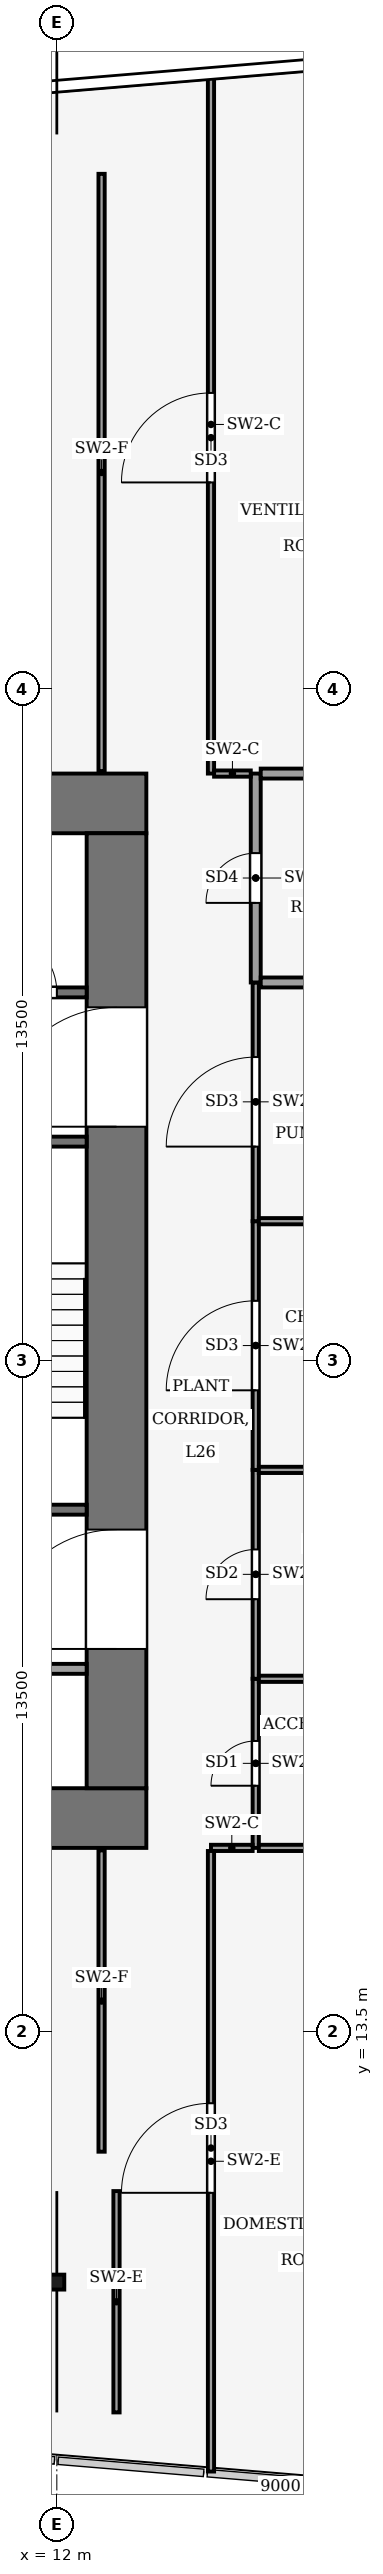
"""IFC4 building model, lengths in metres.
Left out: names, types, materials, properties, quantities, classifications, styles, units other than length and angle.
Written with IfcOpenShell. Run it as: python <this file> out.ifc"""

import sys

from ifc_helpers import new_model, si_unit, direction, frame, frame_2d, origin, origin_2d, place, context, subcontext, project, spatial, rectangle, hollow_rectangle, i_section, extrude, element, fill, save


model = new_model("IFC4")
c1 = context("Model", 3, precision=1e-05, world=origin(), true_north=direction((0.0, 1.0)))
c2 = subcontext(c1, "Body", "Model", "MODEL_VIEW")
j1 = project(units=[si_unit("LENGTHUNIT", "METRE"), si_unit("PLANEANGLEUNIT", "RADIAN")], contexts=[c1])
p1 = place(None, origin())
s1 = spatial("IfcSite", under=j1, at=p1, CompositionType="ELEMENT")
p2 = place(p1, origin())
s2 = spatial("IfcBuilding", under=s1, at=p2, CompositionType="ELEMENT")
p3 = place(p2, frame((0.0, 0.0, 114.0)))
s3 = spatial("IfcBuildingStorey", under=s2, at=p3, CompositionType="ELEMENT", Elevation=114.0)
for number, where, z_axis, x_axis in (
    (1, (-13.8, 17.8, -0.25), (0.0, 0.0, 1.0), (1.0, 0.0, 0.0)),
    (2, (-13.8, 38.2, -0.25), (0.0, 0.0, 1.0), (1.0, 0.0, 0.0)),
):
    element("IfcWall", number, at=place(p3, frame(where, z_axis=z_axis, x_axis=x_axis)), inside=s3, PredefinedType="SHEAR", context=c2, shape_type="SweptSolid", body=[
        extrude(rectangle(XDim=27.6, YDim=1.2, at=frame_2d((13.8, 0.0))), origin(), (0.0, 0.0, 1.0), 7.12),
    ])
p4 = place(p3, frame((13.2, 18.4, -0.25), z_axis=(0.0, 0.0, 1.0), x_axis=(0.0, 1.0, 0.0)))
e3 = element("IfcWall", 3, at=p4, inside=s3, PredefinedType="SHEAR", context=c2, shape_type="SweptSolid", body=[
    extrude(rectangle(XDim=19.2, YDim=1.2, at=frame_2d((9.6, 0.0))), origin(), (0.0, 0.0, 1.0), 7.12),
])
p5 = place(p4, frame((2.8, 0.0, 0.25)))
e4 = element("IfcOpeningElement", 4, at=p5, cuts=e3, PredefinedType="OPENING", context=c2, shape_type="SweptSolid", body=[
    extrude(rectangle(XDim=2.4, YDim=2.4, at=frame_2d((1.2, 1.2))), frame((0.0, 0.61, 0.0), z_axis=(0.0, -1.0, 0.0), x_axis=(1.0, 0.0, 0.0)), (0.0, 0.0, 1.0), 1.22),
])
p6 = place(p4, frame((13.3, 0.0, 0.25)))
e5 = element("IfcOpeningElement", 5, at=p6, cuts=e3, PredefinedType="OPENING", context=c2, shape_type="SweptSolid", body=[
    extrude(rectangle(XDim=2.4, YDim=2.4, at=frame_2d((1.2, 1.2))), frame((0.0, 0.61, 0.0), z_axis=(0.0, -1.0, 0.0), x_axis=(1.0, 0.0, 0.0)), (0.0, 0.0, 1.0), 1.22),
])
p7 = place(p3, frame((12.0, 51.65, 0.337), z_axis=(0.0, 0.786264551358, 0.617890002571), x_axis=(-1.0, 0.0, 0.0)))
e6 = element("IfcColumn", 6, at=p7, inside=s3, PredefinedType="COLUMN", context=c2, shape_type="SweptSolid", body=[
    extrude(hollow_rectangle(XDim=0.8, YDim=0.8, WallThickness=0.04, at=origin_2d()), origin(), (0.0, 0.0, 1.0), 10.238),
])
p8 = place(p3, frame((12.0, 5.85, 0.253), z_axis=(0.0, 0.565283029437, 0.824897021834), x_axis=(-1.0, 0.0, 0.0)))
e7 = element("IfcColumn", 7, at=p8, inside=s3, PredefinedType="COLUMN", context=c2, shape_type="SweptSolid", body=[
    extrude(hollow_rectangle(XDim=0.8, YDim=0.8, WallThickness=0.04, at=origin_2d()), origin(), (0.0, 0.0, 1.0), 7.872),
])
p9 = place(p3, frame((12.0, 8.47, 5.003), z_axis=(0.0, 0.0, 1.0), x_axis=(1.0, 0.0, 0.0)))
e8 = element("IfcColumn", 8, at=p9, inside=s3, PredefinedType="COLUMN", context=c2, shape_type="SweptSolid", body=[
    extrude(i_section(OverallWidth=0.3, OverallDepth=0.3, WebThickness=0.011, FlangeThickness=0.019, FilletRadius=0.027, at=origin_2d()), origin(), (0.0, 0.0, 1.0), 1.697),
])
p10 = place(p3, frame((6.0, 20.8, 0.0), z_axis=(0.0, 0.0, 1.0), x_axis=(1.0, 0.0, 0.0)))
e9 = element("IfcWall", 9, at=p10, inside=s3, PredefinedType="PARTITIONING", context=c2, shape_type="SweptSolid", body=[
    extrude(rectangle(XDim=6.6, YDim=0.2, at=frame_2d((3.3, 0.0))), origin(), (0.0, 0.0, 1.0), 6.87),
])
p11 = place(p10, frame((2.8, 0.0, 0.0)))
e10 = element("IfcOpeningElement", 10, at=p11, cuts=e9, PredefinedType="OPENING", context=c2, shape_type="SweptSolid", body=[
    extrude(rectangle(XDim=1.0, YDim=2.1, at=frame_2d((0.5, 1.05))), frame((0.0, 0.11, 0.0), z_axis=(0.0, -1.0, 0.0), x_axis=(1.0, 0.0, 0.0)), (0.0, 0.0, 1.0), 0.22),
])
p12 = place(p3, frame((6.0, 24.0, 0.0), z_axis=(0.0, 0.0, 1.0), x_axis=(1.0, 0.0, 0.0)))
e11 = element("IfcWall", 11, at=p12, inside=s3, PredefinedType="PARTITIONING", context=c2, shape_type="SweptSolid", body=[
    extrude(rectangle(XDim=6.6, YDim=0.2, at=frame_2d((3.3, 0.0))), origin(), (0.0, 0.0, 1.0), 6.87),
])
p13 = place(p12, frame((0.9, 0.0, 0.0)))
e12 = element("IfcOpeningElement", 12, at=p13, cuts=e11, PredefinedType="OPENING", context=c2, shape_type="SweptSolid", body=[
    extrude(rectangle(XDim=1.0, YDim=2.1, at=frame_2d((0.5, 1.05))), frame((0.0, 0.11, 0.0), z_axis=(0.0, -1.0, 0.0), x_axis=(1.0, 0.0, 0.0)), (0.0, 0.0, 1.0), 0.22),
])
p14 = place(p12, frame((4.4, 0.0, 0.0)))
e13 = element("IfcOpeningElement", 13, at=p14, cuts=e11, PredefinedType="OPENING", context=c2, shape_type="SweptSolid", body=[
    extrude(rectangle(XDim=1.2, YDim=2.2, at=frame_2d((0.6, 1.1))), frame((0.0, 0.11, 0.0), z_axis=(0.0, -1.0, 0.0), x_axis=(1.0, 0.0, 0.0)), (0.0, 0.0, 1.0), 0.22),
])
p15 = place(p3, frame((6.0, 31.4, 0.0), z_axis=(0.0, 0.0, 1.0), x_axis=(1.0, 0.0, 0.0)))
e14 = element("IfcWall", 14, at=p15, inside=s3, PredefinedType="PARTITIONING", context=c2, shape_type="SweptSolid", body=[
    extrude(rectangle(XDim=6.6, YDim=0.2, at=frame_2d((3.3, 0.0))), origin(), (0.0, 0.0, 1.0), 6.87),
])
p16 = place(p3, frame((6.0, 34.4, 0.0), z_axis=(0.0, 0.0, 1.0), x_axis=(1.0, 0.0, 0.0)))
e15 = element("IfcWall", 15, at=p16, inside=s3, PredefinedType="PARTITIONING", context=c2, shape_type="SweptSolid", body=[
    extrude(rectangle(XDim=6.6, YDim=0.2, at=frame_2d((3.3, 0.0))), origin(), (0.0, 0.0, 1.0), 6.87),
])
p17 = place(p16, frame((4.8, 0.0, 0.0)))
e16 = element("IfcOpeningElement", 16, at=p17, cuts=e15, PredefinedType="OPENING", context=c2, shape_type="SweptSolid", body=[
    extrude(rectangle(XDim=1.2, YDim=2.2, at=frame_2d((0.6, 1.1))), frame((0.0, 0.11, 0.0), z_axis=(0.0, -1.0, 0.0), x_axis=(1.0, 0.0, 0.0)), (0.0, 0.0, 1.0), 0.22),
])
p18 = place(p3, frame((16.0, 17.2, 0.0), z_axis=(0.0, 0.0, 1.0), x_axis=(0.0, 1.0, 0.0)))
e17 = element("IfcWall", 17, at=p18, inside=s3, PredefinedType="PARTITIONING", context=c2, shape_type="SweptSolid", body=[
    extrude(rectangle(XDim=3.4, YDim=0.125, at=frame_2d((1.7, 0.0))), origin(), (0.0, 0.0, 1.0), 6.14),
])
p19 = place(p18, frame((1.25, 0.0, 0.0)))
e18 = element("IfcOpeningElement", 18, at=p19, cuts=e17, PredefinedType="OPENING", context=c2, shape_type="SweptSolid", body=[
    extrude(rectangle(XDim=0.9, YDim=2.1, at=frame_2d((0.45, 1.05))), frame((0.0, 0.073, 0.0), z_axis=(0.0, -1.0, 0.0), x_axis=(1.0, 0.0, 0.0)), (0.0, 0.0, 1.0), 0.145),
])
p20 = place(p3, frame((16.0, 20.6, 0.0), z_axis=(0.0, 0.0, 1.0), x_axis=(0.0, 1.0, 0.0)))
e19 = element("IfcWall", 19, at=p20, inside=s3, PredefinedType="PARTITIONING", context=c2, shape_type="SweptSolid", body=[
    extrude(rectangle(XDim=4.2, YDim=0.125, at=frame_2d((2.1, 0.0))), origin(), (0.0, 0.0, 1.0), 6.44),
])
p21 = place(p20, frame((1.6, 0.0, 0.0)))
e20 = element("IfcOpeningElement", 20, at=p21, cuts=e19, PredefinedType="OPENING", context=c2, shape_type="SweptSolid", body=[
    extrude(rectangle(XDim=1.0, YDim=2.1, at=frame_2d((0.5, 1.05))), frame((0.0, 0.073, 0.0), z_axis=(0.0, -1.0, 0.0), x_axis=(1.0, 0.0, 0.0)), (0.0, 0.0, 1.0), 0.145),
])
p22 = place(p3, frame((16.0, 24.8, 0.0), z_axis=(0.0, 0.0, 1.0), x_axis=(0.0, 1.0, 0.0)))
e21 = element("IfcWall", 21, at=p22, inside=s3, PredefinedType="PARTITIONING", context=c2, shape_type="SweptSolid", body=[
    extrude(rectangle(XDim=5.0, YDim=0.125, at=frame_2d((2.5, 0.0))), origin(), (0.0, 0.0, 1.0), 6.44),
])
p23 = place(p22, frame((1.6, 0.0, 0.0)))
e22 = element("IfcOpeningElement", 22, at=p23, cuts=e21, PredefinedType="OPENING", context=c2, shape_type="SweptSolid", body=[
    extrude(rectangle(XDim=1.8, YDim=2.4, at=frame_2d((0.9, 1.2))), frame((0.0, 0.073, 0.0), z_axis=(0.0, -1.0, 0.0), x_axis=(1.0, 0.0, 0.0)), (0.0, 0.0, 1.0), 0.145),
])
p24 = place(p3, frame((16.0, 29.8, 0.0), z_axis=(0.0, 0.0, 1.0), x_axis=(0.0, 1.0, 0.0)))
e23 = element("IfcWall", 23, at=p24, inside=s3, PredefinedType="PARTITIONING", context=c2, shape_type="SweptSolid", body=[
    extrude(rectangle(XDim=4.8, YDim=0.125, at=frame_2d((2.4, 0.0))), origin(), (0.0, 0.0, 1.0), 6.44),
])
p25 = place(p24, frame((1.5, 0.0, 0.0)))
e24 = element("IfcOpeningElement", 24, at=p25, cuts=e23, PredefinedType="OPENING", context=c2, shape_type="SweptSolid", body=[
    extrude(rectangle(XDim=1.8, YDim=2.4, at=frame_2d((0.9, 1.2))), frame((0.0, 0.073, 0.0), z_axis=(0.0, -1.0, 0.0), x_axis=(1.0, 0.0, 0.0)), (0.0, 0.0, 1.0), 0.145),
])
p26 = place(p3, frame((16.0, 34.6, 0.0), z_axis=(0.0, 0.0, 1.0), x_axis=(0.0, 1.0, 0.0)))
e25 = element("IfcWall", 25, at=p26, inside=s3, PredefinedType="PARTITIONING", context=c2, shape_type="SweptSolid", body=[
    extrude(rectangle(XDim=4.2, YDim=0.2, at=frame_2d((2.1, 0.0))), origin(), (0.0, 0.0, 1.0), 6.14),
])
p27 = place(p26, frame((1.6, 0.0, 0.0)))
e26 = element("IfcOpeningElement", 26, at=p27, cuts=e25, PredefinedType="OPENING", context=c2, shape_type="SweptSolid", body=[
    extrude(rectangle(XDim=1.0, YDim=2.1, at=frame_2d((0.5, 1.05))), frame((0.0, 0.11, 0.0), z_axis=(0.0, -1.0, 0.0), x_axis=(1.0, 0.0, 0.0)), (0.0, 0.0, 1.0), 0.22),
])
p28 = place(p3, frame((15.938, 17.2, 0.0), z_axis=(0.0, 0.0, 1.0), x_axis=(-1.0, 0.0, 0.0)))
e27 = element("IfcWall", 27, at=p28, inside=s3, PredefinedType="PARTITIONING", context=c2, shape_type="SweptSolid", body=[
    extrude(rectangle(XDim=0.837, YDim=0.125, at=frame_2d((0.419, 0.0))), origin(), (0.0, 0.0, 1.0), 6.14),
])
p29 = place(p3, frame((15.1, 4.662, 0.0), z_axis=(0.0, 0.0, 1.0), x_axis=(0.0, 1.0, 0.0)))
e28 = element("IfcWall", 28, at=p29, inside=s3, PredefinedType="PARTITIONING", context=c2, shape_type="SweptSolid", body=[
    extrude(rectangle(XDim=12.476, YDim=0.125, at=frame_2d((6.238, 0.0))), origin(), (0.0, 0.0, 1.0), 6.04),
])
p30 = place(p29, frame((5.604, 0.0, 0.0)))
e29 = element("IfcOpeningElement", 29, at=p30, cuts=e28, PredefinedType="OPENING", context=c2, shape_type="SweptSolid", body=[
    extrude(rectangle(XDim=1.8, YDim=2.4, at=frame_2d((0.9, 1.2))), frame((0.0, 0.073, 0.0), z_axis=(0.0, -1.0, 0.0), x_axis=(1.0, 0.0, 0.0)), (0.0, 0.0, 1.0), 0.145),
])
p31 = place(p3, frame((15.1, 38.8, 0.0), z_axis=(0.0, 0.0, 1.0), x_axis=(0.0, 1.0, 0.0)))
e30 = element("IfcWall", 30, at=p31, inside=s3, PredefinedType="PARTITIONING", context=c2, shape_type="SweptSolid", body=[
    extrude(rectangle(XDim=14.038, YDim=0.125, at=frame_2d((7.019, 0.0))), origin(), (0.0, 0.0, 1.0), 6.14),
])
p32 = place(p31, frame((5.854, 0.0, 0.0)))
e31 = element("IfcOpeningElement", 31, at=p32, cuts=e30, PredefinedType="OPENING", context=c2, shape_type="SweptSolid", body=[
    extrude(rectangle(XDim=1.8, YDim=2.4, at=frame_2d((0.9, 1.2))), frame((0.0, 0.073, 0.0), z_axis=(0.0, -1.0, 0.0), x_axis=(1.0, 0.0, 0.0)), (0.0, 0.0, 1.0), 0.145),
])
p33 = place(p3, frame((15.163, 38.8, 0.0), z_axis=(0.0, 0.0, 1.0), x_axis=(1.0, 0.0, 0.0)))
e32 = element("IfcWall", 32, at=p33, inside=s3, PredefinedType="PARTITIONING", context=c2, shape_type="SweptSolid", body=[
    extrude(rectangle(XDim=0.737, YDim=0.125, at=frame_2d((0.369, 0.0))), origin(), (0.0, 0.0, 1.0), 6.14),
])
p34 = place(p3, frame((16.062, 20.6, 0.0), z_axis=(0.0, 0.0, 1.0), x_axis=(1.0, 0.0, 0.0)))
e33 = element("IfcWall", 33, at=p34, inside=s3, PredefinedType="PARTITIONING", context=c2, shape_type="SweptSolid", body=[
    extrude(rectangle(XDim=3.837, YDim=0.125, at=frame_2d((1.919, 0.0))), origin(), (0.0, 0.0, 1.0), 6.87),
])
p35 = place(p3, frame((19.9, 17.2, 0.0), z_axis=(0.0, 0.0, 1.0), x_axis=(-1.0, 0.0, 0.0)))
e34 = element("IfcWall", 34, at=p35, inside=s3, PredefinedType="PARTITIONING", context=c2, shape_type="SweptSolid", body=[
    extrude(rectangle(XDim=3.837, YDim=0.125, at=frame_2d((1.919, 0.0))), origin(), (0.0, 0.0, 1.0), 6.14),
])
p36 = place(p3, frame((16.062, 24.8, 0.0), z_axis=(0.0, 0.0, 1.0), x_axis=(1.0, 0.0, 0.0)))
e35 = element("IfcWall", 35, at=p36, inside=s3, PredefinedType="PARTITIONING", context=c2, shape_type="SweptSolid", body=[
    extrude(rectangle(XDim=3.837, YDim=0.125, at=frame_2d((1.919, 0.0))), origin(), (0.0, 0.0, 1.0), 6.87),
])
p37 = place(p3, frame((16.062, 29.8, 0.0), z_axis=(0.0, 0.0, 1.0), x_axis=(1.0, 0.0, 0.0)))
e36 = element("IfcWall", 36, at=p37, inside=s3, PredefinedType="PARTITIONING", context=c2, shape_type="SweptSolid", body=[
    extrude(rectangle(XDim=3.738, YDim=0.125, at=frame_2d((1.869, 0.0))), origin(), (0.0, 0.0, 1.0), 6.87),
])
p38 = place(p3, frame((16.1, 34.6, 0.0), z_axis=(0.0, 0.0, 1.0), x_axis=(1.0, 0.0, 0.0)))
e37 = element("IfcWall", 37, at=p38, inside=s3, PredefinedType="PARTITIONING", context=c2, shape_type="SweptSolid", body=[
    extrude(rectangle(XDim=3.7, YDim=0.2, at=frame_2d((1.85, 0.0))), origin(), (0.0, 0.0, 1.0), 6.87),
])
p39 = place(p3, frame((16.1, 38.8, 0.0), z_axis=(0.0, 0.0, 1.0), x_axis=(1.0, 0.0, 0.0)))
e38 = element("IfcWall", 38, at=p39, inside=s3, PredefinedType="PARTITIONING", context=c2, shape_type="SweptSolid", body=[
    extrude(rectangle(XDim=3.8, YDim=0.2, at=frame_2d((1.9, 0.0))), origin(), (0.0, 0.0, 1.0), 6.14),
])
p40 = place(p3, frame((13.2, 5.85, 0.0), z_axis=(0.0, 0.0, 1.0), x_axis=(0.0, 1.0, 0.0)))
e39 = element("IfcWall", 39, at=p40, inside=s3, PredefinedType="PARTITIONING", context=c2, shape_type="SweptSolid", body=[
    extrude(rectangle(XDim=4.45, YDim=0.125, at=frame_2d((2.225, 0.0))), origin(), (0.0, 0.0, 1.0), 6.04),
])
p41 = place(p3, frame((12.9, 11.092, 0.0), z_axis=(0.0, 0.0, 1.0), x_axis=(0.0, 1.0, 0.0)))
e40 = element("IfcWall", 40, at=p41, inside=s3, PredefinedType="PARTITIONING", context=c2, shape_type="SweptSolid", body=[
    extrude(rectangle(XDim=6.058, YDim=0.125, at=frame_2d((3.029, 0.0))), origin(), (0.0, 0.0, 1.0), 6.87),
])
p42 = place(p3, frame((12.9, 38.85, 0.0), z_axis=(0.0, 0.0, 1.0), x_axis=(0.0, 1.0, 0.0)))
e41 = element("IfcWall", 41, at=p42, inside=s3, PredefinedType="PARTITIONING", context=c2, shape_type="SweptSolid", body=[
    extrude(rectangle(XDim=12.008, YDim=0.125, at=frame_2d((6.004, 0.0))), origin(), (0.0, 0.0, 1.0), 6.87),
])
p43 = place(p17, origin())
e42 = element("IfcDoor", 42, at=p43, inside=s3, OperationType="SINGLE_SWING_RIGHT", PredefinedType="DOOR", context=c2, shape_type="SweptSolid", body=[
    extrude(rectangle(XDim=1.2, YDim=2.2, at=frame_2d((0.6, 1.1))), frame((0.0, 0.025, 0.0), z_axis=(0.0, -1.0, 0.0), x_axis=(1.0, 0.0, 0.0)), (0.0, 0.0, 1.0), 0.05),
])
fill(e16, e42)
p44 = place(p5, origin())
e43 = element("IfcDoor", 43, at=p44, inside=s3, OperationType="DOUBLE_DOOR_SINGLE_SWING", PredefinedType="DOOR", context=c2, shape_type="SweptSolid", body=[
    extrude(rectangle(XDim=2.4, YDim=2.4, at=frame_2d((1.2, 1.2))), frame((0.0, 0.025, 0.0), z_axis=(0.0, -1.0, 0.0), x_axis=(1.0, 0.0, 0.0)), (0.0, 0.0, 1.0), 0.05),
])
fill(e4, e43)
p45 = place(p6, origin())
e44 = element("IfcDoor", 44, at=p45, inside=s3, OperationType="DOUBLE_DOOR_SINGLE_SWING", PredefinedType="DOOR", context=c2, shape_type="SweptSolid", body=[
    extrude(rectangle(XDim=2.4, YDim=2.4, at=frame_2d((1.2, 1.2))), frame((0.0, 0.025, 0.0), z_axis=(0.0, -1.0, 0.0), x_axis=(1.0, 0.0, 0.0)), (0.0, 0.0, 1.0), 0.05),
])
fill(e5, e44)
p46 = place(p19, origin())
e45 = element("IfcDoor", 45, at=p46, inside=s3, OperationType="SINGLE_SWING_LEFT", PredefinedType="DOOR", context=c2, shape_type="SweptSolid", body=[
    extrude(rectangle(XDim=0.9, YDim=2.1, at=frame_2d((0.45, 1.05))), frame((0.0, 0.025, 0.0), z_axis=(0.0, -1.0, 0.0), x_axis=(1.0, 0.0, 0.0)), (0.0, 0.0, 1.0), 0.05),
])
fill(e18, e45)
p47 = place(p21, origin())
e46 = element("IfcDoor", 46, at=p47, inside=s3, OperationType="SINGLE_SWING_RIGHT", PredefinedType="DOOR", context=c2, shape_type="SweptSolid", body=[
    extrude(rectangle(XDim=1.0, YDim=2.1, at=frame_2d((0.5, 1.05))), frame((0.0, 0.025, 0.0), z_axis=(0.0, -1.0, 0.0), x_axis=(1.0, 0.0, 0.0)), (0.0, 0.0, 1.0), 0.05),
])
fill(e20, e46)
p48 = place(p23, origin())
e47 = element("IfcDoor", 47, at=p48, inside=s3, OperationType="DOUBLE_DOOR_SINGLE_SWING", PredefinedType="DOOR", context=c2, shape_type="SweptSolid", body=[
    extrude(rectangle(XDim=1.8, YDim=2.4, at=frame_2d((0.9, 1.2))), frame((0.0, 0.025, 0.0), z_axis=(0.0, -1.0, 0.0), x_axis=(1.0, 0.0, 0.0)), (0.0, 0.0, 1.0), 0.05),
])
fill(e22, e47)
p49 = place(p25, origin())
e48 = element("IfcDoor", 48, at=p49, inside=s3, OperationType="DOUBLE_DOOR_SINGLE_SWING", PredefinedType="DOOR", context=c2, shape_type="SweptSolid", body=[
    extrude(rectangle(XDim=1.8, YDim=2.4, at=frame_2d((0.9, 1.2))), frame((0.0, 0.025, 0.0), z_axis=(0.0, -1.0, 0.0), x_axis=(1.0, 0.0, 0.0)), (0.0, 0.0, 1.0), 0.05),
])
fill(e24, e48)
p50 = place(p27, origin())
e49 = element("IfcDoor", 49, at=p50, inside=s3, OperationType="SINGLE_SWING_LEFT", PredefinedType="DOOR", context=c2, shape_type="SweptSolid", body=[
    extrude(rectangle(XDim=1.0, YDim=2.1, at=frame_2d((0.5, 1.05))), frame((0.0, 0.025, 0.0), z_axis=(0.0, -1.0, 0.0), x_axis=(1.0, 0.0, 0.0)), (0.0, 0.0, 1.0), 0.05),
])
fill(e26, e49)
p51 = place(p30, origin())
e50 = element("IfcDoor", 50, at=p51, inside=s3, OperationType="DOUBLE_DOOR_SINGLE_SWING", PredefinedType="DOOR", context=c2, shape_type="SweptSolid", body=[
    extrude(rectangle(XDim=1.8, YDim=2.4, at=frame_2d((0.9, 1.2))), frame((0.0, 0.025, 0.0), z_axis=(0.0, -1.0, 0.0), x_axis=(1.0, 0.0, 0.0)), (0.0, 0.0, 1.0), 0.05),
])
fill(e29, e50)
p52 = place(p32, origin())
e51 = element("IfcDoor", 51, at=p52, inside=s3, OperationType="DOUBLE_DOOR_SINGLE_SWING", PredefinedType="DOOR", context=c2, shape_type="SweptSolid", body=[
    extrude(rectangle(XDim=1.8, YDim=2.4, at=frame_2d((0.9, 1.2))), frame((0.0, 0.025, 0.0), z_axis=(0.0, -1.0, 0.0), x_axis=(1.0, 0.0, 0.0)), (0.0, 0.0, 1.0), 0.05),
])
fill(e31, e51)
save(model, sys.argv[1])
